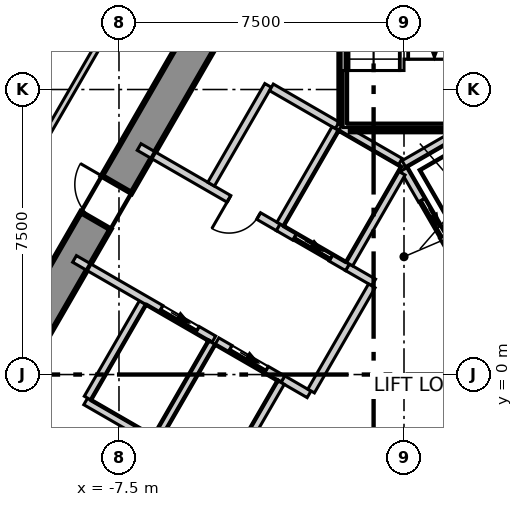
"""IFC4 building model, lengths in metres.
Left out: names, types, materials, properties, quantities, classifications, styles, units other than length and angle.
Written with IfcOpenShell. Run it as: python <this file> out.ifc"""

import sys

from ifc_helpers import new_model, si_unit, direction, frame, frame_2d, origin, place, context, subcontext, project, spatial, polyline, rectangle, outline, extrude, element, fill, save


model = new_model("IFC4")
c1 = context("Model", 3, precision=1e-05, world=origin(), true_north=direction((0.0, 1.0)))
c2 = subcontext(c1, "Body", "Model", "MODEL_VIEW")
j1 = project(units=[si_unit("LENGTHUNIT", "METRE"), si_unit("PLANEANGLEUNIT", "RADIAN")], contexts=[c1])
p1 = place(None, origin())
s1 = spatial("IfcSite", under=j1, at=p1, CompositionType="ELEMENT")
p2 = place(p1, origin())
s2 = spatial("IfcBuilding", under=s1, at=p2, CompositionType="ELEMENT")
p3 = place(p2, frame((0.0, 0.0, 83.3)))
s3 = spatial("IfcBuildingStorey", under=s2, at=p3, CompositionType="ELEMENT", Elevation=83.3)
p4 = place(p3, frame((-1.645, 15.25, -0.3), z_axis=(0.0, 0.0, 1.0), x_axis=(-0.500026485275, -0.866010111964, 0.0)))
e1 = element("IfcWall", 1, at=p4, inside=s3, PredefinedType="SHEAR", context=c2, shape_type="SweptSolid", body=[
    extrude(outline(polyline([(-0.26, -0.45), (1.685, -0.45), (3.63, -0.45), (5.576, -0.45), (7.521, -0.45), (9.466, -0.449), (11.411, -0.449), (13.357, -0.449), (15.302, -0.449), (17.247, -0.449), (19.192, -0.449), (21.138, -0.449), (23.083, -0.449), (25.028, -0.449), (24.509, 0.45), (22.644, 0.45), (20.778, 0.45), (18.913, 0.45), (17.048, 0.45), (15.182, 0.449), (13.317, 0.449), (11.452, 0.449), (9.587, 0.449), (7.721, 0.449), (5.856, 0.449), (3.991, 0.449), (2.125, 0.449), (0.26, 0.449), (-0.26, -0.45)])), origin(), (0.0, 0.0, 1.0), 4.0),
])
p5 = place(p4, frame((11.834, 0.0, 0.3)))
e2 = element("IfcOpeningElement", 2, at=p5, cuts=e1, PredefinedType="OPENING", context=c2, shape_type="SweptSolid", body=[
    extrude(rectangle(XDim=1.1, YDim=2.1, at=frame_2d((0.55, 1.05))), frame((0.0, 0.46, 0.0), z_axis=(0.0, -1.0, 0.0), x_axis=(1.0, 0.0, 0.0)), (0.0, 0.0, 1.0), 0.92),
])
p6 = place(p4, frame((18.976, 0.0, 0.3)))
e3 = element("IfcOpeningElement", 3, at=p6, cuts=e1, PredefinedType="OPENING", context=c2, shape_type="SweptSolid", body=[
    extrude(rectangle(XDim=0.9, YDim=2.1, at=frame_2d((0.45, 1.05))), frame((0.0, 0.46, 0.0), z_axis=(0.0, -1.0, 0.0), x_axis=(1.0, 0.0, 0.0)), (0.0, 0.0, 1.0), 0.92),
])
p7 = place(p3, frame((-3.28, 36.577, 0.0), z_axis=(0.0, 0.0, 1.0), x_axis=(-0.500001635065, -0.866024459777, 0.0)))
e4 = element("IfcWall", 4, at=p7, inside=s3, PredefinedType="ELEMENTEDWALL", context=c2, shape_type="SweptSolid", body=[
    extrude(rectangle(XDim=60.053, YDim=0.2, at=frame_2d((30.027, 0.0))), origin(), (0.0, 0.0, 1.0), 3.7),
])
p8 = place(p7, frame((2.094, 0.0, 0.9)))
e5 = element("IfcOpeningElement", 5, at=p8, cuts=e4, PredefinedType="OPENING", context=c2, shape_type="SweptSolid", body=[
    extrude(rectangle(XDim=5.6, YDim=2.5, at=frame_2d((2.8, 1.25))), frame((0.0, 0.11, 0.0), z_axis=(0.0, -1.0, 0.0), x_axis=(1.0, 0.0, 0.0)), (0.0, 0.0, 1.0), 0.22),
])
p9 = place(p7, frame((9.278, 0.0, 0.9)))
e6 = element("IfcOpeningElement", 6, at=p9, cuts=e4, PredefinedType="OPENING", context=c2, shape_type="SweptSolid", body=[
    extrude(rectangle(XDim=5.6, YDim=2.5, at=frame_2d((2.8, 1.25))), frame((0.0, 0.11, 0.0), z_axis=(0.0, -1.0, 0.0), x_axis=(1.0, 0.0, 0.0)), (0.0, 0.0, 1.0), 0.22),
])
p10 = place(p7, frame((16.461, 0.0, 0.9)))
e7 = element("IfcOpeningElement", 7, at=p10, cuts=e4, PredefinedType="OPENING", context=c2, shape_type="SweptSolid", body=[
    extrude(rectangle(XDim=5.6, YDim=2.5, at=frame_2d((2.8, 1.25))), frame((0.0, 0.11, 0.0), z_axis=(0.0, -1.0, 0.0), x_axis=(1.0, 0.0, 0.0)), (0.0, 0.0, 1.0), 0.22),
])
p11 = place(p7, frame((23.645, 0.0, 0.9)))
e8 = element("IfcOpeningElement", 8, at=p11, cuts=e4, PredefinedType="OPENING", context=c2, shape_type="SweptSolid", body=[
    extrude(rectangle(XDim=5.6, YDim=2.5, at=frame_2d((2.8, 1.25))), frame((0.0, 0.11, 0.0), z_axis=(0.0, -1.0, 0.0), x_axis=(1.0, 0.0, 0.0)), (0.0, 0.0, 1.0), 0.22),
])
p12 = place(p7, frame((30.828, 0.0, 0.9)))
e9 = element("IfcOpeningElement", 9, at=p12, cuts=e4, PredefinedType="OPENING", context=c2, shape_type="SweptSolid", body=[
    extrude(rectangle(XDim=5.6, YDim=2.5, at=frame_2d((2.8, 1.25))), frame((0.0, 0.11, 0.0), z_axis=(0.0, -1.0, 0.0), x_axis=(1.0, 0.0, 0.0)), (0.0, 0.0, 1.0), 0.22),
])
p13 = place(p7, frame((38.012, 0.0, 0.9)))
e10 = element("IfcOpeningElement", 10, at=p13, cuts=e4, PredefinedType="OPENING", context=c2, shape_type="SweptSolid", body=[
    extrude(rectangle(XDim=5.6, YDim=2.5, at=frame_2d((2.8, 1.25))), frame((0.0, 0.11, 0.0), z_axis=(0.0, -1.0, 0.0), x_axis=(1.0, 0.0, 0.0)), (0.0, 0.0, 1.0), 0.22),
])
p14 = place(p7, frame((45.195, 0.0, 0.9)))
e11 = element("IfcOpeningElement", 11, at=p14, cuts=e4, PredefinedType="OPENING", context=c2, shape_type="SweptSolid", body=[
    extrude(rectangle(XDim=5.6, YDim=2.5, at=frame_2d((2.8, 1.25))), frame((0.0, 0.11, 0.0), z_axis=(0.0, -1.0, 0.0), x_axis=(1.0, 0.0, 0.0)), (0.0, 0.0, 1.0), 0.22),
])
p15 = place(p7, frame((52.379, 0.0, 0.9)))
e12 = element("IfcOpeningElement", 12, at=p15, cuts=e4, PredefinedType="OPENING", context=c2, shape_type="SweptSolid", body=[
    extrude(rectangle(XDim=5.6, YDim=2.5, at=frame_2d((2.8, 1.25))), frame((0.0, 0.11, 0.0), z_axis=(0.0, -1.0, 0.0), x_axis=(1.0, 0.0, 0.0)), (0.0, 0.0, 1.0), 0.22),
])
p16 = place(p3, frame((-19.497, -11.17, 0.0), z_axis=(0.0, 0.0, 1.0), x_axis=(0.499998854553, 0.866026065108, 0.0)))
e13 = element("IfcWall", 13, at=p16, inside=s3, PredefinedType="PARTITIONING", context=c2, shape_type="SweptSolid", body=[
    extrude(rectangle(XDim=38.994, YDim=0.15, at=frame_2d((19.497, 0.0))), origin(), (0.0, 0.0, 1.0), 3.7),
])
p17 = place(p16, frame((35.844, 0.0, 0.0)))
e14 = element("IfcOpeningElement", 14, at=p17, cuts=e13, PredefinedType="OPENING", context=c2, shape_type="SweptSolid", body=[
    extrude(rectangle(XDim=1.1, YDim=2.1, at=frame_2d((0.55, 1.05))), frame((0.0, 0.085, 0.0), z_axis=(0.0, -1.0, 0.0), x_axis=(1.0, 0.0, 0.0)), (0.0, 0.0, 1.0), 0.17),
])
p18 = place(p16, frame((26.04, 0.0, 0.0)))
e15 = element("IfcOpeningElement", 15, at=p18, cuts=e13, PredefinedType="OPENING", context=c2, shape_type="SweptSolid", body=[
    extrude(rectangle(XDim=1.1, YDim=2.1, at=frame_2d((0.55, 1.05))), frame((0.0, 0.085, 0.0), z_axis=(0.0, -1.0, 0.0), x_axis=(1.0, 0.0, 0.0)), (0.0, 0.0, 1.0), 0.17),
])
p19 = place(p16, frame((7.272, 0.0, 0.0)))
e16 = element("IfcOpeningElement", 16, at=p19, cuts=e13, PredefinedType="OPENING", context=c2, shape_type="SweptSolid", body=[
    extrude(rectangle(XDim=1.1, YDim=2.1, at=frame_2d((0.55, 1.05))), frame((0.0, 0.085, 0.0), z_axis=(0.0, -1.0, 0.0), x_axis=(1.0, 0.0, 0.0)), (0.0, 0.0, 1.0), 0.17),
])
p20 = place(p16, frame((17.372, 0.0, 0.0)))
e17 = element("IfcOpeningElement", 17, at=p20, cuts=e13, PredefinedType="OPENING", context=c2, shape_type="SweptSolid", body=[
    extrude(rectangle(XDim=0.9, YDim=2.1, at=frame_2d((0.45, 1.05))), frame((0.0, 0.085, 0.0), z_axis=(0.0, -1.0, 0.0), x_axis=(1.0, 0.0, 0.0)), (0.0, 0.0, 1.0), 0.17),
])
p21 = place(p16, frame((14.172, 0.0, 0.0)))
e18 = element("IfcOpeningElement", 18, at=p21, cuts=e13, PredefinedType="OPENING", context=c2, shape_type="SweptSolid", body=[
    extrude(rectangle(XDim=0.9, YDim=2.1, at=frame_2d((0.45, 1.05))), frame((0.0, 0.085, 0.0), z_axis=(0.0, -1.0, 0.0), x_axis=(1.0, 0.0, 0.0)), (0.0, 0.0, 1.0), 0.17),
])
p22 = place(p16, frame((11.272, 0.0, 0.0)))
e19 = element("IfcOpeningElement", 19, at=p22, cuts=e13, PredefinedType="OPENING", context=c2, shape_type="SweptSolid", body=[
    extrude(rectangle(XDim=1.0, YDim=2.1, at=frame_2d((0.5, 1.05))), frame((0.0, 0.085, 0.0), z_axis=(0.0, -1.0, 0.0), x_axis=(1.0, 0.0, 0.0)), (0.0, 0.0, 1.0), 0.17),
])
p23 = place(p16, frame((1.904, 0.0, 0.0)))
e20 = element("IfcOpeningElement", 20, at=p23, cuts=e13, PredefinedType="OPENING", context=c2, shape_type="SweptSolid", body=[
    extrude(rectangle(XDim=1.1, YDim=2.1, at=frame_2d((0.55, 1.05))), frame((0.0, 0.085, 0.0), z_axis=(0.0, -1.0, 0.0), x_axis=(1.0, 0.0, 0.0)), (0.0, 0.0, 1.0), 0.17),
])
p24 = place(p3, frame((0.075, 22.47, 0.0), z_axis=(0.0, 0.0, 1.0), x_axis=(0.500002280369, -0.866024087209, 0.0)))
e21 = element("IfcWall", 21, at=p24, inside=s3, PredefinedType="PARTITIONING", context=c2, shape_type="SweptSolid", body=[
    extrude(rectangle(XDim=38.844, YDim=0.15, at=frame_2d((19.422, 0.0))), origin(), (0.0, 0.0, 1.0), 3.7),
])
p25 = place(p24, frame((35.844, 0.0, 0.0)))
e22 = element("IfcOpeningElement", 22, at=p25, cuts=e21, PredefinedType="OPENING", context=c2, shape_type="SweptSolid", body=[
    extrude(rectangle(XDim=1.1, YDim=2.1, at=frame_2d((0.55, 1.05))), frame((0.0, 0.085, 0.0), z_axis=(0.0, -1.0, 0.0), x_axis=(1.0, 0.0, 0.0)), (0.0, 0.0, 1.0), 0.17),
])
p26 = place(p24, frame((14.44, 0.0, 0.0)))
e23 = element("IfcOpeningElement", 23, at=p26, cuts=e21, PredefinedType="OPENING", context=c2, shape_type="SweptSolid", body=[
    extrude(rectangle(XDim=1.1, YDim=2.1, at=frame_2d((0.55, 1.05))), frame((0.0, 0.085, 0.0), z_axis=(0.0, -1.0, 0.0), x_axis=(1.0, 0.0, 0.0)), (0.0, 0.0, 1.0), 0.17),
])
p27 = place(p24, frame((31.74, 0.0, 0.0)))
e24 = element("IfcOpeningElement", 24, at=p27, cuts=e21, PredefinedType="OPENING", context=c2, shape_type="SweptSolid", body=[
    extrude(rectangle(XDim=0.9, YDim=2.1, at=frame_2d((0.45, 1.05))), frame((0.0, 0.085, 0.0), z_axis=(0.0, -1.0, 0.0), x_axis=(1.0, 0.0, 0.0)), (0.0, 0.0, 1.0), 0.17),
])
p28 = place(p24, frame((28.54, 0.0, 0.0)))
e25 = element("IfcOpeningElement", 25, at=p28, cuts=e21, PredefinedType="OPENING", context=c2, shape_type="SweptSolid", body=[
    extrude(rectangle(XDim=0.9, YDim=2.1, at=frame_2d((0.45, 1.05))), frame((0.0, 0.085, 0.0), z_axis=(0.0, -1.0, 0.0), x_axis=(1.0, 0.0, 0.0)), (0.0, 0.0, 1.0), 0.17),
])
p29 = place(p24, frame((25.74, 0.0, 0.0)))
e26 = element("IfcOpeningElement", 26, at=p29, cuts=e21, PredefinedType="OPENING", context=c2, shape_type="SweptSolid", body=[
    extrude(rectangle(XDim=1.0, YDim=2.1, at=frame_2d((0.5, 1.05))), frame((0.0, 0.085, 0.0), z_axis=(0.0, -1.0, 0.0), x_axis=(1.0, 0.0, 0.0)), (0.0, 0.0, 1.0), 0.17),
])
p30 = place(p24, frame((1.905, 0.0, 0.0)))
e27 = element("IfcOpeningElement", 27, at=p30, cuts=e21, PredefinedType="OPENING", context=c2, shape_type="SweptSolid", body=[
    extrude(rectangle(XDim=1.1, YDim=2.1, at=frame_2d((0.55, 1.05))), frame((0.0, 0.085, 0.0), z_axis=(0.0, -1.0, 0.0), x_axis=(1.0, 0.0, 0.0)), (0.0, 0.0, 1.0), 0.17),
])
p31 = place(p3, frame((-12.866, 7.515, 0.0), z_axis=(0.0, 0.0, 1.0), x_axis=(0.499947407797, 0.866055765778, 0.0)))
e28 = element("IfcWall", 28, at=p31, inside=s3, PredefinedType="PARTITIONING", context=c2, shape_type="SweptSolid", body=[
    extrude(rectangle(XDim=14.217, YDim=0.15, at=frame_2d((7.109, 0.0))), origin(), (0.0, 0.0, 1.0), 3.7),
])
p32 = place(p31, frame((6.642, 0.0, 0.0)))
e29 = element("IfcOpeningElement", 29, at=p32, cuts=e28, PredefinedType="OPENING", context=c2, shape_type="SweptSolid", body=[
    extrude(rectangle(XDim=1.0, YDim=2.1, at=frame_2d((0.5, 1.05))), frame((0.0, 0.085, 0.0), z_axis=(0.0, -1.0, 0.0), x_axis=(1.0, 0.0, 0.0)), (0.0, 0.0, 1.0), 0.17),
])
p33 = place(p3, frame((-8.376, -0.707, 0.0), z_axis=(0.0, 0.0, 1.0), x_axis=(0.866067520717, -0.499927044236, 0.0)))
e30 = element("IfcWall", 30, at=p33, inside=s3, PredefinedType="SOLIDWALL", context=c2, shape_type="SweptSolid", body=[
    extrude(rectangle(XDim=2.1, YDim=0.2, at=frame_2d((1.05, 0.0))), origin(), (0.0, 0.0, 1.0), 3.7),
])
p34 = place(p3, frame((-8.326, -0.62, 0.0), z_axis=(0.0, 0.0, 1.0), x_axis=(0.500023687443, 0.866011727401, 0.0)))
e31 = element("IfcWall", 31, at=p34, inside=s3, PredefinedType="SOLIDWALL", context=c2, shape_type="SweptSolid", body=[
    extrude(rectangle(XDim=2.9, YDim=0.2, at=frame_2d((1.45, 0.0))), origin(), (0.0, 0.0, 1.0), 3.7),
])
p35 = place(p3, frame((-0.002, 5.541, 0.0), z_axis=(0.0, 0.0, 1.0), x_axis=(0.86600155993, 0.500041296494, 0.0)))
e32 = element("IfcWall", 32, at=p35, inside=s3, PredefinedType="SOLIDWALL", context=c2, shape_type="SweptSolid", body=[
    extrude(rectangle(XDim=4.132, YDim=0.2, at=frame_2d((2.066, 0.0))), origin(), (0.0, 0.0, 1.0), 3.7),
])
p36 = place(p3, frame((0.0, 5.4, 0.0), z_axis=(0.0, 0.0, 1.0), x_axis=(0.500103862429, -0.865965430478, 0.0)))
e33 = element("IfcWall", 33, at=p36, inside=s3, PredefinedType="SOLIDWALL", context=c2, shape_type="SweptSolid", body=[
    extrude(rectangle(XDim=2.973, YDim=0.2, at=frame_2d((1.487, 0.0))), origin(), (0.0, 0.0, 1.0), 3.7),
])
p37 = place(p36, frame((0.937, 0.0, 0.0)))
e34 = element("IfcOpeningElement", 34, at=p37, cuts=e33, PredefinedType="OPENING", context=c2, shape_type="SweptSolid", body=[
    extrude(rectangle(XDim=1.1, YDim=2.1, at=frame_2d((0.55, 1.05))), frame((0.0, 0.11, 0.0), z_axis=(0.0, -1.0, 0.0), x_axis=(1.0, 0.0, 0.0)), (0.0, 0.0, 1.0), 0.22),
])
p38 = place(p3, frame((-8.67, 3.043, 0.0), z_axis=(0.0, 0.0, 1.0), x_axis=(0.866029956157, -0.499992114976, 0.0)))
e35 = element("IfcWall", 35, at=p38, inside=s3, PredefinedType="SOLIDWALL", context=c2, shape_type="SweptSolid", body=[
    extrude(rectangle(XDim=4.232, YDim=0.2, at=frame_2d((2.116, 0.0))), origin(), (0.0, 0.0, 1.0), 3.7),
])
p39 = place(p38, frame((2.63, 0.0, 0.0)))
e36 = element("IfcOpeningElement", 36, at=p39, cuts=e35, PredefinedType="OPENING", context=c2, shape_type="SweptSolid", body=[
    extrude(rectangle(XDim=1.1, YDim=2.1, at=frame_2d((0.55, 1.05))), frame((0.0, 0.11, 0.0), z_axis=(0.0, -1.0, 0.0), x_axis=(1.0, 0.0, 0.0)), (0.0, 0.0, 1.0), 0.22),
])
p40 = place(p3, frame((-3.188, -0.122, 0.0), z_axis=(0.0, 0.0, 1.0), x_axis=(0.865705793592, -0.50055317294, 0.0)))
e37 = element("IfcWall", 37, at=p40, inside=s3, PredefinedType="SOLIDWALL", context=c2, shape_type="SweptSolid", body=[
    extrude(rectangle(XDim=0.797, YDim=0.2, at=frame_2d((0.398, 0.0))), origin(), (0.0, 0.0, 1.0), 3.7),
])
p41 = place(p3, frame((-6.97, 5.987, 0.0), z_axis=(0.0, 0.0, 1.0), x_axis=(0.866029956157, -0.499992114976, 0.0)))
e38 = element("IfcWall", 38, at=p41, inside=s3, PredefinedType="SOLIDWALL", context=c2, shape_type="SweptSolid", body=[
    extrude(rectangle(XDim=4.232, YDim=0.2, at=frame_2d((2.116, 0.0))), origin(), (0.0, 0.0, 1.0), 3.7),
])
p42 = place(p41, frame((2.73, 0.0, 0.0)))
e39 = element("IfcOpeningElement", 39, at=p42, cuts=e38, PredefinedType="OPENING", context=c2, shape_type="SweptSolid", body=[
    extrude(rectangle(XDim=0.9, YDim=2.1, at=frame_2d((0.45, 1.05))), frame((0.0, 0.11, 0.0), z_axis=(0.0, -1.0, 0.0), x_axis=(1.0, 0.0, 0.0)), (0.0, 0.0, 1.0), 0.22),
])
p43 = place(p3, frame((-1.488, 2.822, 0.0), z_axis=(0.0, 0.0, 1.0), x_axis=(0.866236612152, -0.499633997809, 0.0)))
e40 = element("IfcWall", 40, at=p43, inside=s3, PredefinedType="SOLIDWALL", context=c2, shape_type="SweptSolid", body=[
    extrude(rectangle(XDim=0.796, YDim=0.2, at=frame_2d((0.398, 0.0))), origin(), (0.0, 0.0, 1.0), 3.7),
])
p44 = place(p3, frame((-5.076, 5.009, 0.0), z_axis=(0.0, 0.0, 1.0), x_axis=(0.50002537861, 0.866010750942, 0.0)))
e41 = element("IfcWall", 41, at=p44, inside=s3, PredefinedType="SOLIDWALL", context=c2, shape_type="SweptSolid", body=[
    extrude(rectangle(XDim=3.0, YDim=0.2, at=frame_2d((1.5, 0.0))), origin(), (0.0, 0.0, 1.0), 3.7),
])
p45 = place(p3, frame((-3.489, 7.557, 0.0), z_axis=(0.0, 0.0, 1.0), x_axis=(0.866010750942, -0.50002537861, 0.0)))
e42 = element("IfcWall", 42, at=p45, inside=s3, PredefinedType="SOLIDWALL", context=c2, shape_type="SweptSolid", body=[
    extrude(rectangle(XDim=2.0, YDim=0.2, at=frame_2d((1.0, 0.0))), origin(), (0.0, 0.0, 1.0), 3.7),
])
p46 = place(p3, frame((-2.444, -0.433, 0.0), z_axis=(0.0, 0.0, 1.0), x_axis=(0.500035624827, 0.866004834804, 0.0)))
e43 = element("IfcWall", 43, at=p46, inside=s3, PredefinedType="SOLIDWALL", context=c2, shape_type="SweptSolid", body=[
    extrude(rectangle(XDim=3.194, YDim=0.2, at=frame_2d((1.597, 0.0))), origin(), (0.0, 0.0, 1.0), 3.7),
])
p47 = place(p3, frame((-6.507, -1.67, 0.0), z_axis=(0.0, 0.0, 1.0), x_axis=(0.50012328804, 0.865954211699, 0.0)))
e44 = element("IfcWall", 44, at=p47, inside=s3, PredefinedType="SOLIDWALL", context=c2, shape_type="SweptSolid", body=[
    extrude(rectangle(XDim=2.9, YDim=0.2, at=frame_2d((1.45, 0.0))), origin(), (0.0, 0.0, 1.0), 3.7),
])
p48 = place(p3, frame((-4.922, 0.879, 0.0), z_axis=(0.0, 0.0, 1.0), x_axis=(0.866073918653, -0.499915960366, 0.0)))
e45 = element("IfcWall", 45, at=p48, inside=s3, PredefinedType="SOLIDWALL", context=c2, shape_type="SweptSolid", body=[
    extrude(rectangle(XDim=2.002, YDim=0.2, at=frame_2d((1.001, 0.0))), origin(), (0.0, 0.0, 1.0), 3.7),
])
p49 = place(p48, frame((0.402, 0.0, 0.0)))
e46 = element("IfcOpeningElement", 46, at=p49, cuts=e45, PredefinedType="OPENING", context=c2, shape_type="SweptSolid", body=[
    extrude(rectangle(XDim=1.1, YDim=2.1, at=frame_2d((0.55, 1.05))), frame((0.0, 0.11, 0.0), z_axis=(0.0, -1.0, 0.0), x_axis=(1.0, 0.0, 0.0)), (0.0, 0.0, 1.0), 0.22),
])
p50 = place(p3, frame((-4.619, -2.6, 0.0), z_axis=(0.0, 0.0, 1.0), x_axis=(0.50009492287, 0.865970593103, 0.0)))
e47 = element("IfcWall", 47, at=p50, inside=s3, PredefinedType="SOLIDWALL", context=c2, shape_type="SweptSolid", body=[
    extrude(rectangle(XDim=2.761, YDim=0.2, at=frame_2d((1.381, 0.0))), origin(), (0.0, 0.0, 1.0), 3.7),
])
p51 = place(p3, frame((-3.309, 3.873, 0.0), z_axis=(0.0, 0.0, 1.0), x_axis=(0.866098583652, -0.499873227325, 0.0)))
e48 = element("IfcWall", 48, at=p51, inside=s3, PredefinedType="SOLIDWALL", context=c2, shape_type="SweptSolid", body=[
    extrude(rectangle(XDim=2.103, YDim=0.2, at=frame_2d((1.051, 0.0))), origin(), (0.0, 0.0, 1.0), 3.7),
])
p52 = place(p51, frame((0.502, 0.0, 0.0)))
e49 = element("IfcOpeningElement", 49, at=p52, cuts=e48, PredefinedType="OPENING", context=c2, shape_type="SweptSolid", body=[
    extrude(rectangle(XDim=1.1, YDim=2.1, at=frame_2d((0.55, 1.05))), frame((0.0, 0.11, 0.0), z_axis=(0.0, -1.0, 0.0), x_axis=(1.0, 0.0, 0.0)), (0.0, 0.0, 1.0), 0.22),
])
p53 = place(p3, frame((-3.257, 3.959, 0.0), z_axis=(0.0, 0.0, 1.0), x_axis=(0.50012328804, 0.865954211699, 0.0)))
e50 = element("IfcWall", 50, at=p53, inside=s3, PredefinedType="SOLIDWALL", context=c2, shape_type="SweptSolid", body=[
    extrude(rectangle(XDim=2.9, YDim=0.2, at=frame_2d((1.45, 0.0))), origin(), (0.0, 0.0, 1.0), 3.7),
])
p54 = place(p3, frame((-1.67, 6.507, 0.0), z_axis=(0.0, 0.0, 1.0), x_axis=(0.865941441609, -0.500145398563, 0.0)))
e51 = element("IfcWall", 51, at=p54, inside=s3, PredefinedType="SOLIDWALL", context=c2, shape_type="SweptSolid", body=[
    extrude(rectangle(XDim=1.815, YDim=0.2, at=frame_2d((0.908, 0.0))), origin(), (0.0, 0.0, 1.0), 3.7),
])
p55 = place(p3, frame((-1.438, 2.909, 0.0), z_axis=(0.0, 0.0, 1.0), x_axis=(0.499829630636, 0.866123744241, 0.0)))
e52 = element("IfcWall", 52, at=p55, inside=s3, PredefinedType="SOLIDWALL", context=c2, shape_type="SweptSolid", body=[
    extrude(rectangle(XDim=2.761, YDim=0.2, at=frame_2d((1.38, 0.0))), origin(), (0.0, 0.0, 1.0), 3.7),
])
p56 = place(p3, frame((-1.4, 6.5, 0.0), z_axis=(0.0, 0.0, 1.0), x_axis=(1.0, 0.0, 0.0)))
e53 = element("IfcWall", 53, at=p56, inside=s3, PredefinedType="SOLIDWALL", context=c2, shape_type="SweptSolid", body=[
    extrude(rectangle(XDim=2.8, YDim=0.2, at=frame_2d((1.4, 0.0))), origin(), (0.0, 0.0, 1.0), 3.7),
])
p57 = place(p3, frame((-1.6, 6.615, 0.0), z_axis=(0.0, 0.0, 1.0), x_axis=(0.0, 1.0, 0.0)))
e54 = element("IfcWall", 54, at=p57, inside=s3, PredefinedType="SOLIDWALL", context=c2, shape_type="SweptSolid", body=[
    extrude(rectangle(XDim=8.615, YDim=0.2, at=frame_2d((4.308, 0.0))), origin(), (0.0, 0.0, 1.0), 3.7),
])
p58 = place(p37, origin())
e55 = element("IfcDoor", 55, at=p58, inside=s3, OperationType="SLIDING_TO_LEFT", PredefinedType="DOOR", context=c2, shape_type="SweptSolid", body=[
    extrude(rectangle(XDim=1.1, YDim=2.1, at=frame_2d((0.55, 1.05))), frame((0.0, 0.025, 0.0), z_axis=(0.0, -1.0, 0.0), x_axis=(1.0, 0.0, 0.0)), (0.0, 0.0, 1.0), 0.05),
])
fill(e34, e55)
p59 = place(p49, origin())
e56 = element("IfcDoor", 56, at=p59, inside=s3, OperationType="SLIDING_TO_LEFT", PredefinedType="DOOR", context=c2, shape_type="SweptSolid", body=[
    extrude(rectangle(XDim=1.1, YDim=2.1, at=frame_2d((0.55, 1.05))), frame((0.0, 0.025, 0.0), z_axis=(0.0, -1.0, 0.0), x_axis=(1.0, 0.0, 0.0)), (0.0, 0.0, 1.0), 0.05),
])
fill(e46, e56)
p60 = place(p52, origin())
e57 = element("IfcDoor", 57, at=p60, inside=s3, OperationType="SLIDING_TO_LEFT", PredefinedType="DOOR", context=c2, shape_type="SweptSolid", body=[
    extrude(rectangle(XDim=1.1, YDim=2.1, at=frame_2d((0.55, 1.05))), frame((0.0, 0.025, 0.0), z_axis=(0.0, -1.0, 0.0), x_axis=(1.0, 0.0, 0.0)), (0.0, 0.0, 1.0), 0.05),
])
fill(e49, e57)
p61 = place(p39, origin())
e58 = element("IfcDoor", 58, at=p61, inside=s3, OperationType="SLIDING_TO_LEFT", PredefinedType="DOOR", context=c2, shape_type="SweptSolid", body=[
    extrude(rectangle(XDim=1.1, YDim=2.1, at=frame_2d((0.55, 1.05))), frame((0.0, 0.025, 0.0), z_axis=(0.0, -1.0, 0.0), x_axis=(1.0, 0.0, 0.0)), (0.0, 0.0, 1.0), 0.05),
])
fill(e36, e58)
p62 = place(p42, origin())
e59 = element("IfcDoor", 59, at=p62, inside=s3, OperationType="SINGLE_SWING_LEFT", PredefinedType="DOOR", context=c2, shape_type="SweptSolid", body=[
    extrude(rectangle(XDim=0.9, YDim=2.1, at=frame_2d((0.45, 1.05))), frame((0.0, 0.025, 0.0), z_axis=(0.0, -1.0, 0.0), x_axis=(1.0, 0.0, 0.0)), (0.0, 0.0, 1.0), 0.05),
])
fill(e39, e59)
p63 = place(p5, origin())
e60 = element("IfcDoor", 60, at=p63, inside=s3, OperationType="SINGLE_SWING_LEFT", PredefinedType="DOOR", context=c2, shape_type="SweptSolid", body=[
    extrude(rectangle(XDim=1.1, YDim=2.1, at=frame_2d((0.55, 1.05))), frame((0.0, 0.025, 0.0), z_axis=(0.0, -1.0, 0.0), x_axis=(1.0, 0.0, 0.0)), (0.0, 0.0, 1.0), 0.05),
])
fill(e2, e60)
save(model, sys.argv[1])
